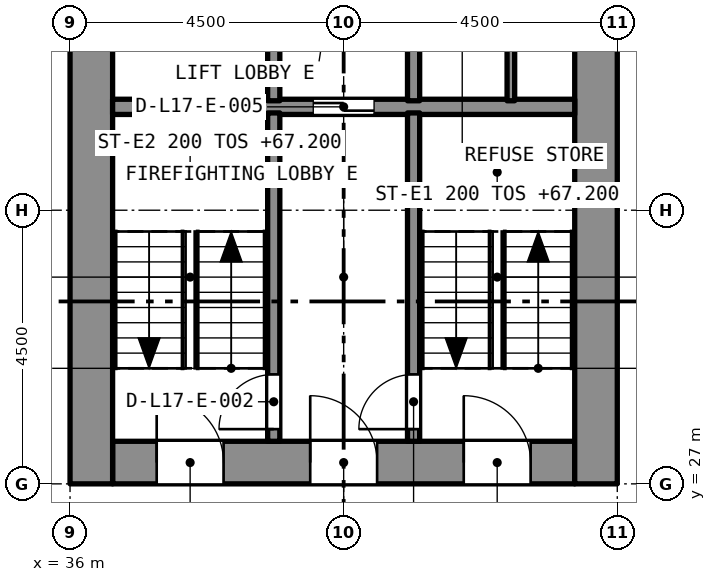
"""IFC4 building model, lengths in metres.
Left out: names, types, materials, properties, quantities, classifications, styles, units other than length and angle.
Written with IfcOpenShell. Run it as: python <this file> out.ifc"""

import sys

from ifc_helpers import new_model, si_unit, direction, frame, frame_2d, origin, place, context, subcontext, project, spatial, rectangle, extrude, element, fill, save


model = new_model("IFC4")
c1 = context("Model", 3, precision=1e-05, world=origin(), true_north=direction((0.0, 1.0)))
c2 = subcontext(c1, "Body", "Model", "MODEL_VIEW")
j1 = project(units=[si_unit("LENGTHUNIT", "METRE"), si_unit("PLANEANGLEUNIT", "RADIAN")], contexts=[c1])
p1 = place(None, origin())
s1 = spatial("IfcSite", under=j1, at=p1, CompositionType="ELEMENT")
p2 = place(p1, origin())
s2 = spatial("IfcBuilding", under=s1, at=p2, CompositionType="ELEMENT")
p3 = place(p2, frame((0.0, 0.0, 65.6)))
s3 = spatial("IfcBuildingStorey", under=s2, at=p3, CompositionType="ELEMENT", Elevation=65.6)
p4 = place(p3, frame((36.7, 27.35, 0.0), z_axis=(0.0, 0.0, 1.0), x_axis=(1.0, 0.0, 0.0)))
e1 = element("IfcWall", 1, at=p4, inside=s3, PredefinedType="SOLIDWALL", context=c2, shape_type="SweptSolid", body=[
    extrude(rectangle(XDim=7.6, YDim=0.7, at=frame_2d((3.8, 0.0))), origin(), (0.0, 0.0, 1.0), 3.2),
])
p5 = place(p4, frame((5.775, 0.0, 0.0)))
e2 = element("IfcOpeningElement", 2, at=p5, cuts=e1, PredefinedType="OPENING", context=c2, shape_type="SweptSolid", body=[
    extrude(rectangle(XDim=1.1, YDim=2.1, at=frame_2d((0.55, 1.05))), frame((0.0, 0.36, 0.0), z_axis=(0.0, -1.0, 0.0), x_axis=(1.0, 0.0, 0.0)), (0.0, 0.0, 1.0), 0.72),
])
p6 = place(p4, frame((3.25, 0.0, 0.0)))
e3 = element("IfcOpeningElement", 3, at=p6, cuts=e1, PredefinedType="OPENING", context=c2, shape_type="SweptSolid", body=[
    extrude(rectangle(XDim=1.1, YDim=2.1, at=frame_2d((0.55, 1.05))), frame((0.0, 0.36, 0.0), z_axis=(0.0, -1.0, 0.0), x_axis=(1.0, 0.0, 0.0)), (0.0, 0.0, 1.0), 0.72),
])
p7 = place(p4, frame((0.725, 0.0, 0.0)))
e4 = element("IfcOpeningElement", 4, at=p7, cuts=e1, PredefinedType="OPENING", context=c2, shape_type="SweptSolid", body=[
    extrude(rectangle(XDim=1.1, YDim=2.1, at=frame_2d((0.55, 1.05))), frame((0.0, 0.36, 0.0), z_axis=(0.0, -1.0, 0.0), x_axis=(1.0, 0.0, 0.0)), (0.0, 0.0, 1.0), 0.72),
])
p8 = place(p3, frame((36.35, 27.0, 0.0), z_axis=(0.0, 0.0, 1.0), x_axis=(0.0, 1.0, 0.0)))
e5 = element("IfcWall", 5, at=p8, inside=s3, PredefinedType="SOLIDWALL", context=c2, shape_type="SweptSolid", body=[
    extrude(rectangle(XDim=13.5, YDim=0.7, at=frame_2d((6.75, 0.0))), origin(), (0.0, 0.0, 1.0), 3.2),
])
p9 = place(p8, frame((8.95, 0.0, 0.0)))
e6 = element("IfcOpeningElement", 6, at=p9, cuts=e5, PredefinedType="OPENING", context=c2, shape_type="SweptSolid", body=[
    extrude(rectangle(XDim=1.2, YDim=2.1, at=frame_2d((0.6, 1.05))), frame((0.0, 0.36, 0.0), z_axis=(0.0, -1.0, 0.0), x_axis=(1.0, 0.0, 0.0)), (0.0, 0.0, 1.0), 0.72),
])
p10 = place(p3, frame((44.65, 27.0, 0.0), z_axis=(0.0, 0.0, 1.0), x_axis=(0.0, 1.0, 0.0)))
e7 = element("IfcWall", 7, at=p10, inside=s3, PredefinedType="SOLIDWALL", context=c2, shape_type="SweptSolid", body=[
    extrude(rectangle(XDim=13.5, YDim=0.7, at=frame_2d((6.75, 0.0))), origin(), (0.0, 0.0, 1.0), 3.2),
])
p11 = place(p10, frame((8.95, 0.0, 0.0)))
e8 = element("IfcOpeningElement", 8, at=p11, cuts=e7, PredefinedType="OPENING", context=c2, shape_type="SweptSolid", body=[
    extrude(rectangle(XDim=1.2, YDim=2.1, at=frame_2d((0.6, 1.05))), frame((0.0, 0.36, 0.0), z_axis=(0.0, -1.0, 0.0), x_axis=(1.0, 0.0, 0.0)), (0.0, 0.0, 1.0), 0.72),
])
p12 = place(p3, frame((36.7, 33.2, 0.0), z_axis=(0.0, 0.0, 1.0), x_axis=(1.0, 0.0, 0.0)))
e9 = element("IfcWall", 9, at=p12, inside=s3, PredefinedType="SOLIDWALL", context=c2, shape_type="SweptSolid", body=[
    extrude(rectangle(XDim=7.6, YDim=0.25, at=frame_2d((3.8, 0.0))), origin(), (0.0, 0.0, 1.0), 2.9),
])
p13 = place(p12, frame((3.3, 0.0, 0.0)))
e10 = element("IfcOpeningElement", 10, at=p13, cuts=e9, PredefinedType="OPENING", context=c2, shape_type="SweptSolid", body=[
    extrude(rectangle(XDim=1.0, YDim=2.1, at=frame_2d((0.5, 1.05))), frame((0.0, 0.135, 0.0), z_axis=(0.0, -1.0, 0.0), x_axis=(1.0, 0.0, 0.0)), (0.0, 0.0, 1.0), 0.27),
])
p14 = place(p3, frame((41.65, 27.7, 0.0), z_axis=(0.0, 0.0, 1.0), x_axis=(0.0, 1.0, 0.0)))
e11 = element("IfcWall", 11, at=p14, inside=s3, PredefinedType="SOLIDWALL", context=c2, shape_type="SweptSolid", body=[
    extrude(rectangle(XDim=5.4, YDim=0.2, at=frame_2d((2.7, 0.0))), origin(), (0.0, 0.0, 1.0), 2.9),
])
p15 = place(p14, frame((0.2, 0.0, 0.0)))
e12 = element("IfcOpeningElement", 12, at=p15, cuts=e11, PredefinedType="OPENING", context=c2, shape_type="SweptSolid", body=[
    extrude(rectangle(XDim=0.9, YDim=2.1, at=frame_2d((0.45, 1.05))), frame((0.0, 0.11, 0.0), z_axis=(0.0, -1.0, 0.0), x_axis=(1.0, 0.0, 0.0)), (0.0, 0.0, 1.0), 0.22),
])
p16 = place(p3, frame((39.35, 27.7, 0.0), z_axis=(0.0, 0.0, 1.0), x_axis=(0.0, 1.0, 0.0)))
e13 = element("IfcWall", 13, at=p16, inside=s3, PredefinedType="SOLIDWALL", context=c2, shape_type="SweptSolid", body=[
    extrude(rectangle(XDim=5.4, YDim=0.2, at=frame_2d((2.7, 0.0))), origin(), (0.0, 0.0, 1.0), 2.9),
])
p17 = place(p16, frame((0.2, 0.0, 0.0)))
e14 = element("IfcOpeningElement", 14, at=p17, cuts=e13, PredefinedType="OPENING", context=c2, shape_type="SweptSolid", body=[
    extrude(rectangle(XDim=0.9, YDim=2.1, at=frame_2d((0.45, 1.05))), frame((0.0, 0.11, 0.0), z_axis=(0.0, -1.0, 0.0), x_axis=(1.0, 0.0, 0.0)), (0.0, 0.0, 1.0), 0.22),
])
for number, where, z_axis, x_axis in (
    (15, (41.65, 33.3, 0.0), (0.0, 0.0, 1.0), (0.0, 1.0, 0.0)),
    (16, (39.35, 33.3, 0.0), (0.0, 0.0, 1.0), (0.0, 1.0, 0.0)),
):
    element("IfcWall", number, at=place(p3, frame(where, z_axis=z_axis, x_axis=x_axis)), inside=s3, PredefinedType="SOLIDWALL", context=c2, shape_type="SweptSolid", body=[
        extrude(rectangle(XDim=2.3, YDim=0.2, at=frame_2d((1.15, 0.0))), origin(), (0.0, 0.0, 1.0), 2.9),
    ])
p18 = place(p3, frame((43.25, 33.3, 0.0), z_axis=(0.0, 0.0, 1.0), x_axis=(0.0, 1.0, 0.0)))
e17 = element("IfcWall", 17, at=p18, inside=s3, PredefinedType="PARTITIONING", context=c2, shape_type="SweptSolid", body=[
    extrude(rectangle(XDim=2.3, YDim=0.125, at=frame_2d((1.15, 0.0))), origin(), (0.0, 0.0, 1.0), 2.9),
])
p19 = place(p15, origin())
e18 = element("IfcDoor", 18, at=p19, inside=s3, OperationType="SINGLE_SWING_LEFT", PredefinedType="DOOR", context=c2, shape_type="SweptSolid", body=[
    extrude(rectangle(XDim=0.9, YDim=2.1, at=frame_2d((0.45, 1.05))), frame((0.0, 0.025, 0.0), z_axis=(0.0, -1.0, 0.0), x_axis=(1.0, 0.0, 0.0)), (0.0, 0.0, 1.0), 0.05),
])
fill(e12, e18)
p20 = place(p17, origin())
e19 = element("IfcDoor", 19, at=p20, inside=s3, OperationType="SINGLE_SWING_LEFT", PredefinedType="DOOR", context=c2, shape_type="SweptSolid", body=[
    extrude(rectangle(XDim=0.9, YDim=2.1, at=frame_2d((0.45, 1.05))), frame((0.0, 0.025, 0.0), z_axis=(0.0, -1.0, 0.0), x_axis=(1.0, 0.0, 0.0)), (0.0, 0.0, 1.0), 0.05),
])
fill(e14, e19)
p21 = place(p13, origin())
e20 = element("IfcDoor", 20, at=p21, inside=s3, OperationType="SLIDING_TO_LEFT", PredefinedType="DOOR", context=c2, shape_type="SweptSolid", body=[
    extrude(rectangle(XDim=1.0, YDim=2.1, at=frame_2d((0.5, 1.05))), frame((0.0, 0.025, 0.0), z_axis=(0.0, -1.0, 0.0), x_axis=(1.0, 0.0, 0.0)), (0.0, 0.0, 1.0), 0.05),
])
fill(e10, e20)
p22 = place(p5, origin())
e21 = element("IfcDoor", 21, at=p22, inside=s3, OperationType="SINGLE_SWING_LEFT", PredefinedType="DOOR", context=c2, shape_type="SweptSolid", body=[
    extrude(rectangle(XDim=1.1, YDim=2.1, at=frame_2d((0.55, 1.05))), frame((0.0, 0.025, 0.0), z_axis=(0.0, -1.0, 0.0), x_axis=(1.0, 0.0, 0.0)), (0.0, 0.0, 1.0), 0.05),
])
fill(e2, e21)
p23 = place(p6, origin())
e22 = element("IfcDoor", 22, at=p23, inside=s3, OperationType="SINGLE_SWING_LEFT", PredefinedType="DOOR", context=c2, shape_type="SweptSolid", body=[
    extrude(rectangle(XDim=1.1, YDim=2.1, at=frame_2d((0.55, 1.05))), frame((0.0, 0.025, 0.0), z_axis=(0.0, -1.0, 0.0), x_axis=(1.0, 0.0, 0.0)), (0.0, 0.0, 1.0), 0.05),
])
fill(e3, e22)
p24 = place(p7, origin())
e23 = element("IfcDoor", 23, at=p24, inside=s3, OperationType="SINGLE_SWING_LEFT", PredefinedType="DOOR", context=c2, shape_type="SweptSolid", body=[
    extrude(rectangle(XDim=1.1, YDim=2.1, at=frame_2d((0.55, 1.05))), frame((0.0, 0.025, 0.0), z_axis=(0.0, -1.0, 0.0), x_axis=(1.0, 0.0, 0.0)), (0.0, 0.0, 1.0), 0.05),
])
fill(e4, e23)
save(model, sys.argv[1])
